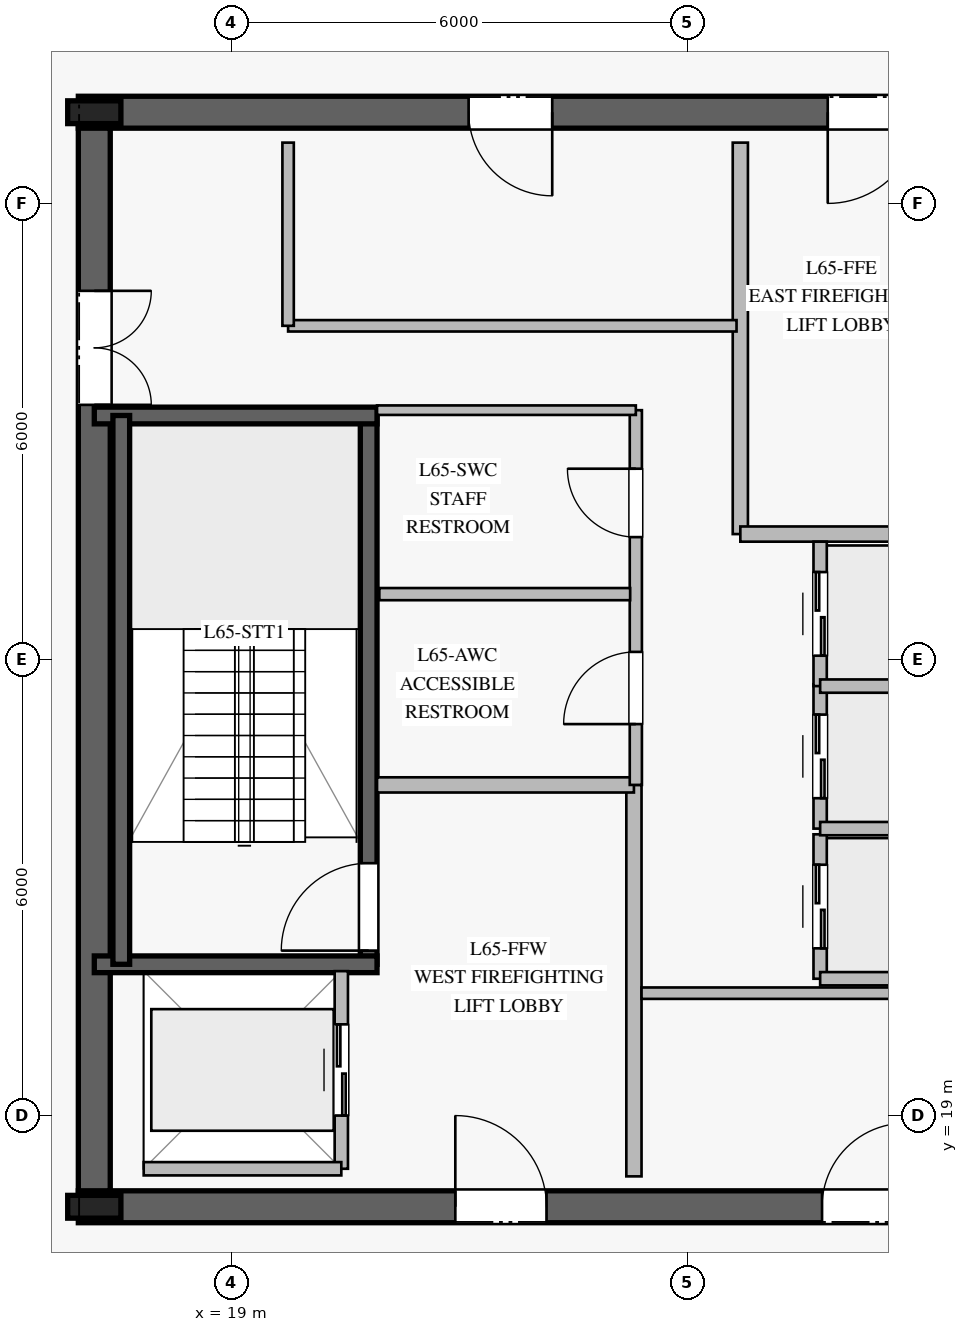
"""IFC4 building model, lengths in metres.
Left out: names, types, materials, properties, quantities, classifications, styles, units other than length and angle.
Written with IfcOpenShell. Run it as: python <this file> out.ifc"""

import sys

from ifc_helpers import new_model, si_unit, direction, frame, frame_2d, origin, origin_2d, place, context, subcontext, project, spatial, rectangle, i_section, extrude, element, fill, save


model = new_model("IFC4")
c1 = context("Model", 3, precision=1e-05, world=origin(), true_north=direction((0.0, 1.0)))
c2 = subcontext(c1, "Body", "Model", "MODEL_VIEW")
j1 = project(units=[si_unit("LENGTHUNIT", "METRE"), si_unit("PLANEANGLEUNIT", "RADIAN")], contexts=[c1])
p1 = place(None, origin())
s1 = spatial("IfcSite", under=j1, at=p1, CompositionType="ELEMENT")
p2 = place(p1, origin())
s2 = spatial("IfcBuilding", under=s1, at=p2, CompositionType="ELEMENT")
p3 = place(p2, frame((0.0, 0.0, 270.2)))
s3 = spatial("IfcBuildingStorey", under=s2, at=p3, CompositionType="ELEMENT", Elevation=270.2)
p4 = place(p3, frame((16.99, 17.8, 0.0), z_axis=(0.0, 0.0, 1.0), x_axis=(1.0, 0.0, 0.0)))
e1 = element("IfcWall", 1, at=p4, inside=s3, PredefinedType="SHEAR", context=c2, shape_type="SweptSolid", body=[
    extrude(rectangle(XDim=16.02, YDim=0.42, at=frame_2d((8.01, 0.0))), origin(), (0.0, 0.0, 1.0), 3.78),
])
p5 = place(p4, frame((4.96, 0.0, 0.0)))
e2 = element("IfcOpeningElement", 2, at=p5, cuts=e1, PredefinedType="OPENING", context=c2, shape_type="SweptSolid", body=[
    extrude(rectangle(XDim=1.2, YDim=2.25, at=frame_2d((0.6, 1.125))), frame((0.0, 0.22, 0.0), z_axis=(0.0, -1.0, 0.0), x_axis=(1.0, 0.0, 0.0)), (0.0, 0.0, 1.0), 0.44),
])
p6 = place(p4, frame((13.91, 0.0, 0.0)))
e3 = element("IfcOpeningElement", 3, at=p6, cuts=e1, PredefinedType="OPENING", context=c2, shape_type="SweptSolid", body=[
    extrude(rectangle(XDim=0.9, YDim=2.1, at=frame_2d((0.45, 1.05))), frame((0.0, 0.22, 0.0), z_axis=(0.0, -1.0, 0.0), x_axis=(1.0, 0.0, 0.0)), (0.0, 0.0, 1.0), 0.44),
])
p7 = place(p4, frame((9.785, 0.0, 0.0)))
e4 = element("IfcOpeningElement", 4, at=p7, cuts=e1, PredefinedType="OPENING", context=c2, shape_type="SweptSolid", body=[
    extrude(rectangle(XDim=1.1, YDim=2.2, at=frame_2d((0.55, 1.1))), frame((0.0, 0.22, 0.0), z_axis=(0.0, -1.0, 0.0), x_axis=(1.0, 0.0, 0.0)), (0.0, 0.0, 1.0), 0.44),
])
p8 = place(p3, frame((33.01, 32.2, 0.0), z_axis=(0.0, 0.0, 1.0), x_axis=(-1.0, 0.0, 0.0)))
e5 = element("IfcWall", 5, at=p8, inside=s3, PredefinedType="SHEAR", context=c2, shape_type="SweptSolid", body=[
    extrude(rectangle(XDim=16.02, YDim=0.42, at=frame_2d((8.01, 0.0))), origin(), (0.0, 0.0, 1.0), 3.78),
])
p9 = place(p8, frame((4.96, 0.0, 0.0)))
e6 = element("IfcOpeningElement", 6, at=p9, cuts=e5, PredefinedType="OPENING", context=c2, shape_type="SweptSolid", body=[
    extrude(rectangle(XDim=1.2, YDim=2.25, at=frame_2d((0.6, 1.125))), frame((0.0, 0.22, 0.0), z_axis=(0.0, -1.0, 0.0), x_axis=(1.0, 0.0, 0.0)), (0.0, 0.0, 1.0), 0.44),
])
p10 = place(p8, frame((9.785, 0.0, 0.0)))
e7 = element("IfcOpeningElement", 7, at=p10, cuts=e5, PredefinedType="OPENING", context=c2, shape_type="SweptSolid", body=[
    extrude(rectangle(XDim=1.1, YDim=2.2, at=frame_2d((0.55, 1.1))), frame((0.0, 0.22, 0.0), z_axis=(0.0, -1.0, 0.0), x_axis=(1.0, 0.0, 0.0)), (0.0, 0.0, 1.0), 0.44),
])
p11 = place(p3, frame((17.2, 31.99, 0.0), z_axis=(0.0, 0.0, 1.0), x_axis=(0.0, -1.0, 0.0)))
e8 = element("IfcWall", 8, at=p11, inside=s3, PredefinedType="SHEAR", context=c2, shape_type="SweptSolid", body=[
    extrude(rectangle(XDim=13.98, YDim=0.42, at=frame_2d((6.99, 0.0))), origin(), (0.0, 0.0, 1.0), 3.78),
])
p12 = place(p11, frame((2.14, 0.0, 0.0)))
e9 = element("IfcOpeningElement", 9, at=p12, cuts=e8, PredefinedType="OPENING", context=c2, shape_type="SweptSolid", body=[
    extrude(rectangle(XDim=1.5, YDim=2.2, at=frame_2d((0.75, 1.1))), frame((0.0, 0.22, 0.0), z_axis=(0.0, -1.0, 0.0), x_axis=(1.0, 0.0, 0.0)), (0.0, 0.0, 1.0), 0.44),
])
for number, where, z_axis, x_axis in (
    (10, (17.2, 17.8, 0.0), (0.0, 0.0, 1.0), (1.0, 0.0, 0.0)),
    (11, (17.2, 32.2, 0.0), (0.0, 0.0, 1.0), (1.0, 0.0, 0.0)),
):
    element("IfcColumn", number, at=place(p3, frame(where, z_axis=z_axis, x_axis=x_axis)), inside=s3, PredefinedType="COLUMN", context=c2, shape_type="SweptSolid", body=[
        extrude(i_section(OverallWidth=0.3, OverallDepth=0.7, WebThickness=0.017, FlangeThickness=0.032, at=origin_2d()), origin(), (0.0, 0.0, 1.0), 4.0),
    ])
p13 = place(p3, frame((20.81, 20.99, 0.0), z_axis=(0.0, 0.0, 1.0), x_axis=(0.0, 1.0, 0.0)))
e12 = element("IfcWall", 12, at=p13, inside=s3, PredefinedType="SOLIDWALL", context=c2, shape_type="SweptSolid", body=[
    extrude(rectangle(XDim=7.22, YDim=0.22, at=frame_2d((3.61, 0.0))), origin(), (0.0, 0.0, 1.0), 3.78),
])
p14 = place(p13, frame((0.18, 0.0, 0.0)))
e13 = element("IfcOpeningElement", 13, at=p14, cuts=e12, PredefinedType="OPENING", context=c2, shape_type="SweptSolid", body=[
    extrude(rectangle(XDim=1.15, YDim=2.2, at=frame_2d((0.575, 1.1))), frame((0.0, 0.12, 0.0), z_axis=(0.0, -1.0, 0.0), x_axis=(1.0, 0.0, 0.0)), (0.0, 0.0, 1.0), 0.24),
])
for number, where, z_axis, x_axis in (
    (14, (17.2, 20.99, 0.0), (0.0, 0.0, 1.0), (1.0, 0.0, 0.0)),
    (15, (17.2, 28.21, 0.0), (0.0, 0.0, 1.0), (1.0, 0.0, 0.0)),
):
    element("IfcWall", number, at=place(p3, frame(where, z_axis=z_axis, x_axis=x_axis)), inside=s3, PredefinedType="SOLIDWALL", context=c2, shape_type="SweptSolid", body=[
        extrude(rectangle(XDim=3.72, YDim=0.22, at=frame_2d((1.86, 0.0))), origin(), (0.0, 0.0, 1.0), 3.78),
    ])
p15 = place(p3, frame((17.555, 28.21, 0.0), z_axis=(0.0, 0.0, 1.0), x_axis=(0.0, -1.0, 0.0)))
e16 = element("IfcWall", 16, at=p15, inside=s3, PredefinedType="SOLIDWALL", context=c2, shape_type="SweptSolid", body=[
    extrude(rectangle(XDim=7.22, YDim=0.22, at=frame_2d((3.61, 0.0))), origin(), (0.0, 0.0, 1.0), 3.78),
])
p16 = place(p3, frame((24.3, 18.2, 0.0), z_axis=(0.0, 0.0, 1.0), x_axis=(0.0, 1.0, 0.0)))
e17 = element("IfcWall", 17, at=p16, inside=s3, PredefinedType="PARTITIONING", context=c2, shape_type="SweptSolid", body=[
    extrude(rectangle(XDim=5.15, YDim=0.2, at=frame_2d((2.575, 0.0))), origin(), (0.0, 0.0, 1.0), 3.78),
])
p17 = place(p3, frame((20.92, 23.35, 0.0), z_axis=(0.0, 0.0, 1.0), x_axis=(1.0, 0.0, 0.0)))
e18 = element("IfcWall", 18, at=p17, inside=s3, PredefinedType="PARTITIONING", context=c2, shape_type="SweptSolid", body=[
    extrude(rectangle(XDim=3.38, YDim=0.2, at=frame_2d((1.69, 0.0))), origin(), (0.0, 0.0, 1.0), 3.78),
])
p18 = place(p3, frame((25.7, 26.65, 0.0), z_axis=(0.0, 0.0, 1.0), x_axis=(0.0, 1.0, 0.0)))
e19 = element("IfcWall", 19, at=p18, inside=s3, PredefinedType="PARTITIONING", context=c2, shape_type="SweptSolid", body=[
    extrude(rectangle(XDim=5.15, YDim=0.2, at=frame_2d((2.575, 0.0))), origin(), (0.0, 0.0, 1.0), 3.78),
])
p19 = place(p3, frame((25.7, 26.65, 0.0), z_axis=(0.0, 0.0, 1.0), x_axis=(1.0, 0.0, 0.0)))
e20 = element("IfcWall", 20, at=p19, inside=s3, PredefinedType="PARTITIONING", context=c2, shape_type="SweptSolid", body=[
    extrude(rectangle(XDim=3.38, YDim=0.2, at=frame_2d((1.69, 0.0))), origin(), (0.0, 0.0, 1.0), 3.78),
])
p20 = place(p3, frame((24.325, 23.35, 0.0), z_axis=(0.0, 0.0, 1.0), x_axis=(0.0, 1.0, 0.0)))
e21 = element("IfcWall", 21, at=p20, inside=s3, PredefinedType="PLUMBINGWALL", context=c2, shape_type="SweptSolid", body=[
    extrude(rectangle(XDim=4.93, YDim=0.16, at=frame_2d((2.465, 0.0))), origin(), (0.0, 0.0, 1.0), 3.78),
])
p21 = place(p20, frame((0.8, 0.0, 0.0)))
e22 = element("IfcOpeningElement", 22, at=p21, cuts=e21, PredefinedType="OPENING", context=c2, shape_type="SweptSolid", body=[
    extrude(rectangle(XDim=0.95, YDim=2.1, at=frame_2d((0.475, 1.05))), frame((0.0, 0.09, 0.0), z_axis=(0.0, -1.0, 0.0), x_axis=(1.0, 0.0, 0.0)), (0.0, 0.0, 1.0), 0.18),
])
p22 = place(p20, frame((3.26, 0.0, 0.0)))
e23 = element("IfcOpeningElement", 23, at=p22, cuts=e21, PredefinedType="OPENING", context=c2, shape_type="SweptSolid", body=[
    extrude(rectangle(XDim=0.9, YDim=2.1, at=frame_2d((0.45, 1.05))), frame((0.0, 0.09, 0.0), z_axis=(0.0, -1.0, 0.0), x_axis=(1.0, 0.0, 0.0)), (0.0, 0.0, 1.0), 0.18),
])
p23 = place(p3, frame((20.92, 28.28, 0.0), z_axis=(0.0, 0.0, 1.0), x_axis=(1.0, 0.0, 0.0)))
e24 = element("IfcWall", 24, at=p23, inside=s3, PredefinedType="PARTITIONING", context=c2, shape_type="SweptSolid", body=[
    extrude(rectangle(XDim=3.405, YDim=0.125, at=frame_2d((1.703, 0.0))), origin(), (0.0, 0.0, 1.0), 3.78),
])
p24 = place(p3, frame((20.95, 25.86, 0.0), z_axis=(0.0, 0.0, 1.0), x_axis=(1.0, 0.0, 0.0)))
e25 = element("IfcWall", 25, at=p24, inside=s3, PredefinedType="PLUMBINGWALL", context=c2, shape_type="SweptSolid", body=[
    extrude(rectangle(XDim=3.3, YDim=0.16, at=frame_2d((1.65, 0.0))), origin(), (0.0, 0.0, 1.0), 3.78),
])
p25 = place(p3, frame((24.4, 20.61, 0.0), z_axis=(0.0, 0.0, 1.0), x_axis=(1.0, 0.0, 0.0)))
e26 = element("IfcWall", 26, at=p25, inside=s3, PredefinedType="PARTITIONING", context=c2, shape_type="SweptSolid", body=[
    extrude(rectangle(XDim=5.9, YDim=0.15, at=frame_2d((2.95, 0.0))), origin(), (0.0, 0.0, 1.0), 3.78),
])
p26 = place(p3, frame((19.75, 29.39, 0.0), z_axis=(0.0, 0.0, 1.0), x_axis=(1.0, 0.0, 0.0)))
e27 = element("IfcWall", 27, at=p26, inside=s3, PredefinedType="PARTITIONING", context=c2, shape_type="SweptSolid", body=[
    extrude(rectangle(XDim=5.9, YDim=0.15, at=frame_2d((2.95, 0.0))), origin(), (0.0, 0.0, 1.0), 3.78),
])
p27 = place(p3, frame((19.75, 29.39, 0.0), z_axis=(0.0, 0.0, 1.0), x_axis=(0.0, 1.0, 0.0)))
e28 = element("IfcWall", 28, at=p27, inside=s3, PredefinedType="PARTITIONING", context=c2, shape_type="SweptSolid", body=[
    extrude(rectangle(XDim=2.41, YDim=0.15, at=frame_2d((1.205, 0.0))), origin(), (0.0, 0.0, 1.0), 3.78),
])
p28 = place(p3, frame((26.75, 20.8, 0.0), z_axis=(0.0, 0.0, 1.0), x_axis=(0.0, 1.0, 0.0)))
e29 = element("IfcWall", 29, at=p28, inside=s3, PredefinedType="PARTITIONING", context=c2, shape_type="SweptSolid", body=[
    extrude(rectangle(XDim=1.9, YDim=0.175, at=frame_2d((0.95, 0.0))), origin(), (0.0, 0.0, 1.0), 3.78),
])
p29 = place(p28, frame((0.4, 0.0, 0.0)))
e30 = element("IfcOpeningElement", 30, at=p29, cuts=e29, PredefinedType="OPENING", context=c2, shape_type="SweptSolid", body=[
    extrude(rectangle(XDim=1.1, YDim=2.2, at=frame_2d((0.55, 1.1))), frame((0.0, 0.098, 0.0), z_axis=(0.0, -1.0, 0.0), x_axis=(1.0, 0.0, 0.0)), (0.0, 0.0, 1.0), 0.195),
])
p30 = place(p3, frame((26.75, 20.8, 0.0), z_axis=(0.0, 0.0, 1.0), x_axis=(1.0, 0.0, 0.0)))
e31 = element("IfcWall", 31, at=p30, inside=s3, PredefinedType="PARTITIONING", context=c2, shape_type="SweptSolid", body=[
    extrude(rectangle(XDim=2.35, YDim=0.175, at=frame_2d((1.175, 0.0))), origin(), (0.0, 0.0, 1.0), 3.78),
])
p31 = place(p3, frame((26.75, 22.775, 0.0), z_axis=(0.0, 0.0, 1.0), x_axis=(0.0, 1.0, 0.0)))
e32 = element("IfcWall", 32, at=p31, inside=s3, PredefinedType="PARTITIONING", context=c2, shape_type="SweptSolid", body=[
    extrude(rectangle(XDim=1.9, YDim=0.175, at=frame_2d((0.95, 0.0))), origin(), (0.0, 0.0, 1.0), 3.78),
])
p32 = place(p31, frame((0.4, 0.0, 0.0)))
e33 = element("IfcOpeningElement", 33, at=p32, cuts=e32, PredefinedType="OPENING", context=c2, shape_type="SweptSolid", body=[
    extrude(rectangle(XDim=1.1, YDim=2.2, at=frame_2d((0.55, 1.1))), frame((0.0, 0.098, 0.0), z_axis=(0.0, -1.0, 0.0), x_axis=(1.0, 0.0, 0.0)), (0.0, 0.0, 1.0), 0.195),
])
p33 = place(p3, frame((26.75, 22.775, 0.0), z_axis=(0.0, 0.0, 1.0), x_axis=(1.0, 0.0, 0.0)))
e34 = element("IfcWall", 34, at=p33, inside=s3, PredefinedType="PARTITIONING", context=c2, shape_type="SweptSolid", body=[
    extrude(rectangle(XDim=2.35, YDim=0.175, at=frame_2d((1.175, 0.0))), origin(), (0.0, 0.0, 1.0), 3.78),
])
p34 = place(p3, frame((26.75, 24.65, 0.0), z_axis=(0.0, 0.0, 1.0), x_axis=(0.0, 1.0, 0.0)))
e35 = element("IfcWall", 35, at=p34, inside=s3, PredefinedType="PARTITIONING", context=c2, shape_type="SweptSolid", body=[
    extrude(rectangle(XDim=1.9, YDim=0.175, at=frame_2d((0.95, 0.0))), origin(), (0.0, 0.0, 1.0), 3.78),
])
p35 = place(p34, frame((0.4, 0.0, 0.0)))
e36 = element("IfcOpeningElement", 36, at=p35, cuts=e35, PredefinedType="OPENING", context=c2, shape_type="SweptSolid", body=[
    extrude(rectangle(XDim=1.1, YDim=2.2, at=frame_2d((0.55, 1.1))), frame((0.0, 0.098, 0.0), z_axis=(0.0, -1.0, 0.0), x_axis=(1.0, 0.0, 0.0)), (0.0, 0.0, 1.0), 0.195),
])
p36 = place(p3, frame((26.75, 24.65, 0.0), z_axis=(0.0, 0.0, 1.0), x_axis=(1.0, 0.0, 0.0)))
e37 = element("IfcWall", 37, at=p36, inside=s3, PredefinedType="PARTITIONING", context=c2, shape_type="SweptSolid", body=[
    extrude(rectangle(XDim=2.35, YDim=0.175, at=frame_2d((1.175, 0.0))), origin(), (0.0, 0.0, 1.0), 3.78),
])
p37 = place(p3, frame((20.45, 18.3, 0.0), z_axis=(0.0, 0.0, 1.0), x_axis=(0.0, 1.0, 0.0)))
e38 = element("IfcWall", 38, at=p37, inside=s3, PredefinedType="PARTITIONING", context=c2, shape_type="SweptSolid", body=[
    extrude(rectangle(XDim=2.6, YDim=0.175, at=frame_2d((1.3, 0.0))), origin(), (0.0, 0.0, 1.0), 3.78),
])
p38 = place(p37, frame((0.7, 0.0, 0.0)))
e39 = element("IfcOpeningElement", 39, at=p38, cuts=e38, PredefinedType="OPENING", context=c2, shape_type="SweptSolid", body=[
    extrude(rectangle(XDim=1.2, YDim=2.2, at=frame_2d((0.6, 1.1))), frame((0.0, 0.098, 0.0), z_axis=(0.0, -1.0, 0.0), x_axis=(1.0, 0.0, 0.0)), (0.0, 0.0, 1.0), 0.195),
])
p39 = place(p3, frame((17.85, 18.3, 0.0), z_axis=(0.0, 0.0, 1.0), x_axis=(1.0, 0.0, 0.0)))
e40 = element("IfcWall", 40, at=p39, inside=s3, PredefinedType="PARTITIONING", context=c2, shape_type="SweptSolid", body=[
    extrude(rectangle(XDim=2.6, YDim=0.175, at=frame_2d((1.3, 0.0))), origin(), (0.0, 0.0, 1.0), 3.78),
])
p40 = place(p14, origin())
e41 = element("IfcDoor", 41, at=p40, inside=s3, OperationType="SINGLE_SWING_LEFT", PredefinedType="DOOR", context=c2, shape_type="SweptSolid", body=[
    extrude(rectangle(XDim=1.15, YDim=2.2, at=frame_2d((0.575, 1.1))), frame((0.0, 0.025, 0.0), z_axis=(0.0, -1.0, 0.0), x_axis=(1.0, 0.0, 0.0)), (0.0, 0.0, 1.0), 0.05),
])
fill(e13, e41)
p41 = place(p5, origin())
e42 = element("IfcDoor", 42, at=p41, inside=s3, OperationType="SINGLE_SWING_LEFT", PredefinedType="DOOR", context=c2, shape_type="SweptSolid", body=[
    extrude(rectangle(XDim=1.2, YDim=2.25, at=frame_2d((0.6, 1.125))), frame((0.0, 0.025, 0.0), z_axis=(0.0, -1.0, 0.0), x_axis=(1.0, 0.0, 0.0)), (0.0, 0.0, 1.0), 0.05),
])
fill(e2, e42)
p42 = place(p9, origin())
e43 = element("IfcDoor", 43, at=p42, inside=s3, OperationType="SINGLE_SWING_RIGHT", PredefinedType="DOOR", context=c2, shape_type="SweptSolid", body=[
    extrude(rectangle(XDim=1.2, YDim=2.25, at=frame_2d((0.6, 1.125))), frame((0.0, 0.025, 0.0), z_axis=(0.0, -1.0, 0.0), x_axis=(1.0, 0.0, 0.0)), (0.0, 0.0, 1.0), 0.05),
])
fill(e6, e43)
p43 = place(p12, origin())
e44 = element("IfcDoor", 44, at=p43, inside=s3, OperationType="DOUBLE_DOOR_SINGLE_SWING", PredefinedType="DOOR", context=c2, shape_type="SweptSolid", body=[
    extrude(rectangle(XDim=1.5, YDim=2.2, at=frame_2d((0.75, 1.1))), frame((0.0, 0.025, 0.0), z_axis=(0.0, -1.0, 0.0), x_axis=(1.0, 0.0, 0.0)), (0.0, 0.0, 1.0), 0.05),
])
fill(e9, e44)
p44 = place(p21, origin())
e45 = element("IfcDoor", 45, at=p44, inside=s3, OperationType="SINGLE_SWING_LEFT", PredefinedType="DOOR", context=c2, shape_type="SweptSolid", body=[
    extrude(rectangle(XDim=0.95, YDim=2.1, at=frame_2d((0.475, 1.05))), frame((0.0, 0.025, 0.0), z_axis=(0.0, -1.0, 0.0), x_axis=(1.0, 0.0, 0.0)), (0.0, 0.0, 1.0), 0.05),
])
fill(e22, e45)
p45 = place(p22, origin())
e46 = element("IfcDoor", 46, at=p45, inside=s3, OperationType="SINGLE_SWING_RIGHT", PredefinedType="DOOR", context=c2, shape_type="SweptSolid", body=[
    extrude(rectangle(XDim=0.9, YDim=2.1, at=frame_2d((0.45, 1.05))), frame((0.0, 0.025, 0.0), z_axis=(0.0, -1.0, 0.0), x_axis=(1.0, 0.0, 0.0)), (0.0, 0.0, 1.0), 0.05),
])
fill(e23, e46)
p46 = place(p7, origin())
e47 = element("IfcDoor", 47, at=p46, inside=s3, OperationType="SINGLE_SWING_RIGHT", PredefinedType="DOOR", context=c2, shape_type="SweptSolid", body=[
    extrude(rectangle(XDim=1.1, YDim=2.2, at=frame_2d((0.55, 1.1))), frame((0.0, 0.025, 0.0), z_axis=(0.0, -1.0, 0.0), x_axis=(1.0, 0.0, 0.0)), (0.0, 0.0, 1.0), 0.05),
])
fill(e4, e47)
p47 = place(p10, origin())
e48 = element("IfcDoor", 48, at=p47, inside=s3, OperationType="SINGLE_SWING_LEFT", PredefinedType="DOOR", context=c2, shape_type="SweptSolid", body=[
    extrude(rectangle(XDim=1.1, YDim=2.2, at=frame_2d((0.55, 1.1))), frame((0.0, 0.025, 0.0), z_axis=(0.0, -1.0, 0.0), x_axis=(1.0, 0.0, 0.0)), (0.0, 0.0, 1.0), 0.05),
])
fill(e7, e48)
p48 = place(p29, origin())
e49 = element("IfcDoor", 49, at=p48, inside=s3, OperationType="DOUBLE_DOOR_SLIDING", PredefinedType="DOOR", context=c2, shape_type="SweptSolid", body=[
    extrude(rectangle(XDim=1.1, YDim=2.2, at=frame_2d((0.55, 1.1))), frame((0.0, 0.025, 0.0), z_axis=(0.0, -1.0, 0.0), x_axis=(1.0, 0.0, 0.0)), (0.0, 0.0, 1.0), 0.05),
])
fill(e30, e49)
p49 = place(p32, origin())
e50 = element("IfcDoor", 50, at=p49, inside=s3, OperationType="DOUBLE_DOOR_SLIDING", PredefinedType="DOOR", context=c2, shape_type="SweptSolid", body=[
    extrude(rectangle(XDim=1.1, YDim=2.2, at=frame_2d((0.55, 1.1))), frame((0.0, 0.025, 0.0), z_axis=(0.0, -1.0, 0.0), x_axis=(1.0, 0.0, 0.0)), (0.0, 0.0, 1.0), 0.05),
])
fill(e33, e50)
p50 = place(p35, origin())
e51 = element("IfcDoor", 51, at=p50, inside=s3, OperationType="DOUBLE_DOOR_SLIDING", PredefinedType="DOOR", context=c2, shape_type="SweptSolid", body=[
    extrude(rectangle(XDim=1.1, YDim=2.2, at=frame_2d((0.55, 1.1))), frame((0.0, 0.025, 0.0), z_axis=(0.0, -1.0, 0.0), x_axis=(1.0, 0.0, 0.0)), (0.0, 0.0, 1.0), 0.05),
])
fill(e36, e51)
p51 = place(p38, origin())
e52 = element("IfcDoor", 52, at=p51, inside=s3, OperationType="DOUBLE_DOOR_SLIDING", PredefinedType="DOOR", context=c2, shape_type="SweptSolid", body=[
    extrude(rectangle(XDim=1.2, YDim=2.2, at=frame_2d((0.6, 1.1))), frame((0.0, 0.025, 0.0), z_axis=(0.0, -1.0, 0.0), x_axis=(1.0, 0.0, 0.0)), (0.0, 0.0, 1.0), 0.05),
])
fill(e39, e52)
save(model, sys.argv[1])
